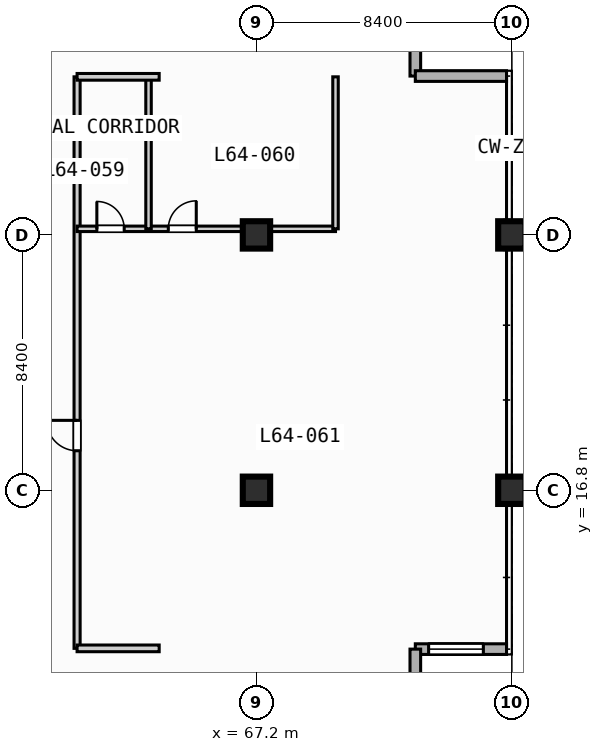
"""IFC4 building model, lengths in metres.
Left out: names, types, materials, properties, quantities, classifications, styles, units other than length and angle.
Written with IfcOpenShell. Run it as: python <this file> out.ifc"""

import sys

from ifc_helpers import new_model, si_unit, direction, frame, frame_2d, origin, origin_2d, place, context, subcontext, project, spatial, rectangle, extrude, element, fill, save


model = new_model("IFC4")
c1 = context("Model", 3, precision=1e-05, world=origin(), true_north=direction((0.0, 1.0)))
c2 = subcontext(c1, "Body", "Model", "MODEL_VIEW")
j1 = project(units=[si_unit("LENGTHUNIT", "METRE"), si_unit("PLANEANGLEUNIT", "RADIAN")], contexts=[c1])
p1 = place(None, origin())
s1 = spatial("IfcSite", under=j1, at=p1, CompositionType="ELEMENT")
p2 = place(p1, origin())
s2 = spatial("IfcBuilding", under=s1, at=p2, CompositionType="ELEMENT")
p3 = place(p2, frame((0.0, 0.0, 260.1)))
s3 = spatial("IfcBuildingStorey", under=s2, at=p3, CompositionType="ELEMENT", Elevation=260.1)
for number, where, z_axis, x_axis in (
    (1, (67.2, 16.8, 0.0), (0.0, 0.0, 1.0), (1.0, 0.0, 0.0)),
    (2, (67.2, 25.2, 0.0), (0.0, 0.0, 1.0), (1.0, 0.0, 0.0)),
    (3, (75.6, 16.8, 0.0), (0.0, 0.0, 1.0), (1.0, 0.0, 0.0)),
    (4, (75.6, 25.2, 0.0), (0.0, 0.0, 1.0), (1.0, 0.0, 0.0)),
):
    element("IfcColumn", number, at=place(p3, frame(where, z_axis=z_axis, x_axis=x_axis)), inside=s3, PredefinedType="COLUMN", context=c2, shape_type="SweptSolid", body=[
        extrude(rectangle(XDim=0.9, YDim=0.9, at=origin_2d()), origin(), (0.0, 0.0, 1.0), 3.7),
    ])
for number, where, z_axis, x_axis in (
    (5, (72.425, 33.425, 0.0), (0.0, 0.0, 1.0), (0.0, -1.0, 0.0)),
    (6, (72.425, 30.425, 0.0), (0.0, 0.0, 1.0), (1.0, 0.0, 0.0)),
):
    element("IfcWall", number, at=place(p3, frame(where, z_axis=z_axis, x_axis=x_axis)), inside=s3, PredefinedType="STANDARD", context=c2, shape_type="SweptSolid", body=[
        extrude(rectangle(XDim=3.0, YDim=0.35, at=frame_2d((1.5, 0.0))), origin(), (0.0, 0.0, 1.0), 3.47),
    ])
p4 = place(p3, frame((75.425, 11.575, 0.0), z_axis=(0.0, 0.0, 1.0), x_axis=(-1.0, 0.0, 0.0)))
e7 = element("IfcWall", 7, at=p4, inside=s3, PredefinedType="STANDARD", context=c2, shape_type="SweptSolid", body=[
    extrude(rectangle(XDim=3.0, YDim=0.35, at=frame_2d((1.5, 0.0))), origin(), (0.0, 0.0, 1.0), 3.47),
])
p5 = place(p4, frame((0.762, 0.0, 0.85)))
e8 = element("IfcOpeningElement", 8, at=p5, cuts=e7, PredefinedType="OPENING", context=c2, shape_type="SweptSolid", body=[
    extrude(rectangle(XDim=1.8, YDim=1.8, at=frame_2d((0.9, 0.9))), frame((0.0, 0.185, 0.0), z_axis=(0.0, -1.0, 0.0), x_axis=(1.0, 0.0, 0.0)), (0.0, 0.0, 1.0), 0.37),
])
p6 = place(p3, frame((72.425, 11.575, 0.0), z_axis=(0.0, 0.0, 1.0), x_axis=(0.0, -1.0, 0.0)))
e9 = element("IfcWall", 9, at=p6, inside=s3, PredefinedType="STANDARD", context=c2, shape_type="SweptSolid", body=[
    extrude(rectangle(XDim=3.0, YDim=0.35, at=frame_2d((1.5, 0.0))), origin(), (0.0, 0.0, 1.0), 3.47),
])
p7 = place(p3, frame((61.3, 11.6, 0.0), z_axis=(0.0, 0.0, 1.0), x_axis=(0.0, 1.0, 0.0)))
e10 = element("IfcWall", 10, at=p7, inside=s3, PredefinedType="PARTITIONING", context=c2, shape_type="SweptSolid", body=[
    extrude(rectangle(XDim=18.8, YDim=0.2, at=frame_2d((9.4, 0.0))), origin(), (0.0, 0.0, 1.0), 3.47),
])
p8 = place(p7, frame((6.5, 0.0, 0.0)))
e11 = element("IfcOpeningElement", 11, at=p8, cuts=e10, PredefinedType="OPENING", context=c2, shape_type="SweptSolid", body=[
    extrude(rectangle(XDim=1.0, YDim=2.15, at=frame_2d((0.5, 1.075))), frame((0.0, 0.11, 0.0), z_axis=(0.0, -1.0, 0.0), x_axis=(1.0, 0.0, 0.0)), (0.0, 0.0, 1.0), 0.22),
])
p9 = place(p3, frame((61.3, 25.4, 0.0), z_axis=(0.0, 0.0, 1.0), x_axis=(1.0, 0.0, 0.0)))
e12 = element("IfcWall", 12, at=p9, inside=s3, PredefinedType="PLUMBINGWALL", context=c2, shape_type="SweptSolid", body=[
    extrude(rectangle(XDim=8.5, YDim=0.18, at=frame_2d((4.25, 0.0))), origin(), (0.0, 0.0, 1.0), 2.82),
])
p10 = place(p9, frame((0.65, 0.0, 0.0)))
e13 = element("IfcOpeningElement", 13, at=p10, cuts=e12, PredefinedType="OPENING", context=c2, shape_type="SweptSolid", body=[
    extrude(rectangle(XDim=0.9, YDim=2.1, at=frame_2d((0.45, 1.05))), frame((0.0, 0.1, 0.0), z_axis=(0.0, -1.0, 0.0), x_axis=(1.0, 0.0, 0.0)), (0.0, 0.0, 1.0), 0.2),
])
p11 = place(p9, frame((3.0, 0.0, 0.0)))
e14 = element("IfcOpeningElement", 14, at=p11, cuts=e12, PredefinedType="OPENING", context=c2, shape_type="SweptSolid", body=[
    extrude(rectangle(XDim=0.92, YDim=2.1, at=frame_2d((0.46, 1.05))), frame((0.0, 0.1, 0.0), z_axis=(0.0, -1.0, 0.0), x_axis=(1.0, 0.0, 0.0)), (0.0, 0.0, 1.0), 0.2),
])
for number, where, z_axis, x_axis in (
    (15, (63.65, 25.4, 0.0), (0.0, 0.0, 1.0), (0.0, 1.0, 0.0)),
    (16, (69.8, 25.4, 0.0), (0.0, 0.0, 1.0), (0.0, 1.0, 0.0)),
):
    element("IfcWall", number, at=place(p3, frame(where, z_axis=z_axis, x_axis=x_axis)), inside=s3, PredefinedType="PLUMBINGWALL", context=c2, shape_type="SweptSolid", body=[
        extrude(rectangle(XDim=5.0, YDim=0.18, at=frame_2d((2.5, 0.0))), origin(), (0.0, 0.0, 1.0), 3.47),
    ])
for number, where, z_axis, x_axis in (
    (17, (61.3, 11.6, 0.0), (0.0, 0.0, 1.0), (1.0, 0.0, 0.0)),
    (18, (61.3, 30.4, 0.0), (0.0, 0.0, 1.0), (1.0, 0.0, 0.0)),
):
    element("IfcWall", number, at=place(p3, frame(where, z_axis=z_axis, x_axis=x_axis)), inside=s3, PredefinedType="PARTITIONING", context=c2, shape_type="SweptSolid", body=[
        extrude(rectangle(XDim=2.7, YDim=0.22, at=frame_2d((1.35, 0.0))), origin(), (0.0, 0.0, 1.0), 3.47),
    ])
p12 = place(p5, origin())
e19 = element("IfcWindow", 19, at=p12, inside=s3, PartitioningType="SINGLE_PANEL", PredefinedType="WINDOW", context=c2, shape_type="SweptSolid", body=[
    extrude(rectangle(XDim=1.8, YDim=1.8, at=frame_2d((0.9, 0.9))), frame((0.0, 0.03, 0.0), z_axis=(0.0, -1.0, 0.0), x_axis=(1.0, 0.0, 0.0)), (0.0, 0.0, 1.0), 0.06),
])
fill(e8, e19)
p13 = place(p8, origin())
e20 = element("IfcDoor", 20, at=p13, inside=s3, OperationType="SINGLE_SWING_RIGHT", PredefinedType="DOOR", context=c2, shape_type="SweptSolid", body=[
    extrude(rectangle(XDim=1.0, YDim=2.15, at=frame_2d((0.5, 1.075))), frame((0.0, 0.025, 0.0), z_axis=(0.0, -1.0, 0.0), x_axis=(1.0, 0.0, 0.0)), (0.0, 0.0, 1.0), 0.05),
])
fill(e11, e20)
p14 = place(p10, origin())
e21 = element("IfcDoor", 21, at=p14, inside=s3, OperationType="SINGLE_SWING_LEFT", PredefinedType="DOOR", context=c2, shape_type="SweptSolid", body=[
    extrude(rectangle(XDim=0.9, YDim=2.1, at=frame_2d((0.45, 1.05))), frame((0.0, 0.025, 0.0), z_axis=(0.0, -1.0, 0.0), x_axis=(1.0, 0.0, 0.0)), (0.0, 0.0, 1.0), 0.05),
])
fill(e13, e21)
p15 = place(p11, origin())
e22 = element("IfcDoor", 22, at=p15, inside=s3, OperationType="SINGLE_SWING_RIGHT", PredefinedType="DOOR", context=c2, shape_type="SweptSolid", body=[
    extrude(rectangle(XDim=0.92, YDim=2.1, at=frame_2d((0.46, 1.05))), frame((0.0, 0.025, 0.0), z_axis=(0.0, -1.0, 0.0), x_axis=(1.0, 0.0, 0.0)), (0.0, 0.0, 1.0), 0.05),
])
fill(e14, e22)
save(model, sys.argv[1])
